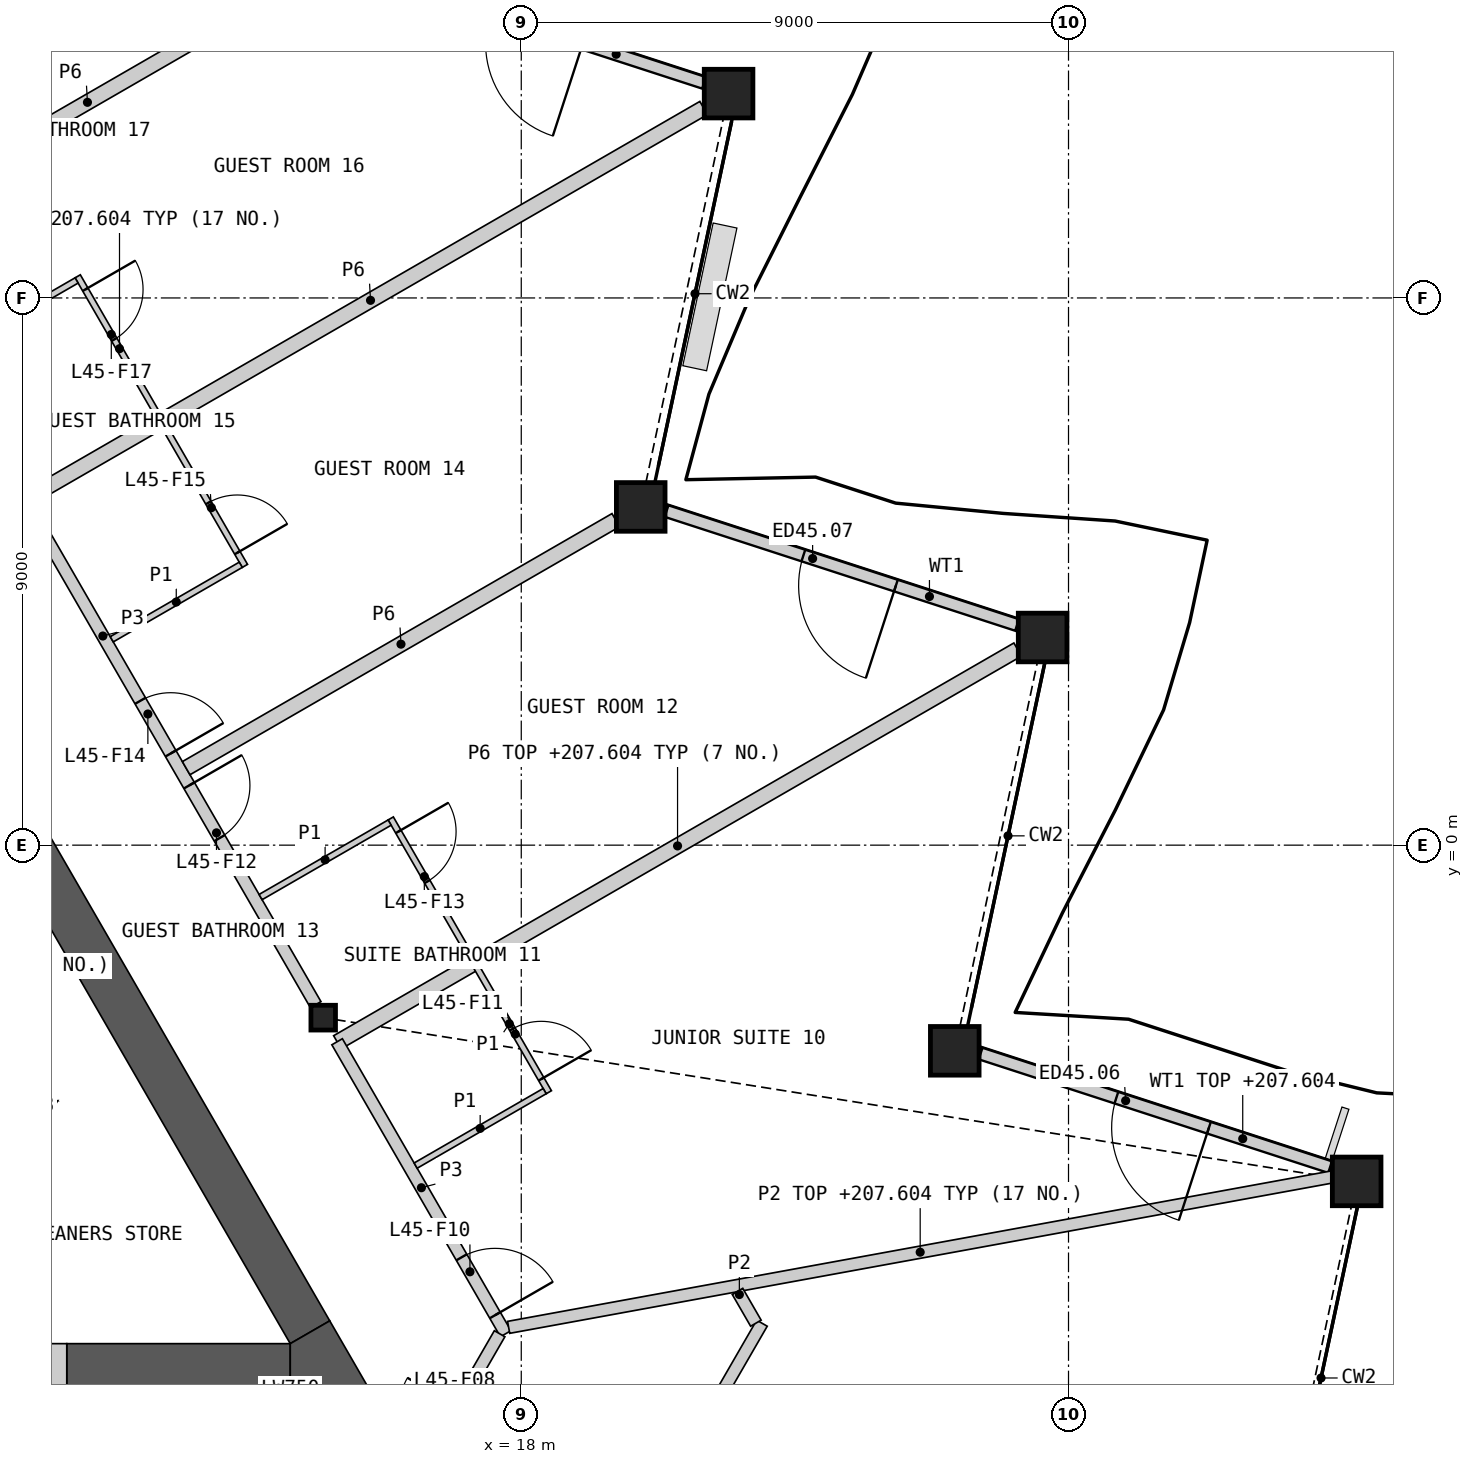
"""IFC4 building model, lengths in metres.
Left out: names, types, materials, properties, quantities, classifications, styles, units other than length and angle.
Written with IfcOpenShell. Run it as: python <this file> out.ifc"""

import sys

from ifc_helpers import new_model, si_unit, direction, frame, frame_2d, origin, origin_2d, place, context, subcontext, project, spatial, polyline, rectangle, hollow_rectangle, i_section, outline, extrude, element, fill, save


model = new_model("IFC4")
c1 = context("Model", 3, precision=1e-05, world=origin(), true_north=direction((0.0, 1.0)))
c2 = subcontext(c1, "Body", "Model", "MODEL_VIEW")
j1 = project(units=[si_unit("LENGTHUNIT", "METRE"), si_unit("PLANEANGLEUNIT", "RADIAN")], contexts=[c1])
p1 = place(None, origin())
s1 = spatial("IfcSite", under=j1, at=p1, CompositionType="ELEMENT")
p2 = place(p1, origin())
s2 = spatial("IfcBuilding", under=s1, at=p2, CompositionType="ELEMENT")
p3 = place(p2, frame((0.0, 0.0, 205.2)))
s3 = spatial("IfcBuildingStorey", under=s2, at=p3, CompositionType="ELEMENT", Elevation=205.2)
for number, where, z_axis, x_axis in (
    (1, (31.739, -5.53, 0.0), (0.0, 0.0, 1.0), (1.0, 0.0, 0.0)),
    (2, (25.129, -3.383, 0.0), (0.0, 0.0, 1.0), (1.0, 0.0, 0.0)),
    (3, (26.574, 3.415, 0.0), (0.0, 0.0, 1.0), (1.0, 0.0, 0.0)),
    (4, (19.965, 5.563, 0.0), (0.0, 0.0, 1.0), (1.0, 0.0, 0.0)),
    (5, (21.409, 12.361, 0.0), (0.0, 0.0, 1.0), (1.0, 0.0, 0.0)),
):
    element("IfcColumn", number, at=place(p3, frame(where, z_axis=z_axis, x_axis=x_axis)), inside=s3, PredefinedType="COLUMN", context=c2, shape_type="SweptSolid", body=[
        extrude(hollow_rectangle(XDim=0.8, YDim=0.8, WallThickness=0.05, at=origin_2d()), origin(), (0.0, 0.0, 1.0), 3.6),
    ])
p4 = place(p3, frame((14.743, -2.837, 0.0), z_axis=(0.0, 0.0, 1.0), x_axis=(1.0, 0.0, 0.0)))
e6 = element("IfcColumn", 6, at=p4, inside=s3, PredefinedType="COLUMN", context=c2, shape_type="SweptSolid", body=[
    extrude(i_section(OverallWidth=0.404, OverallDepth=0.407, WebThickness=0.027, FlangeThickness=0.044, at=origin_2d()), origin(), (0.0, 0.0, 1.0), 3.6),
])
p5 = place(p3, frame((31.302, -5.295, 0.0), z_axis=(0.0, 0.0, 1.0), x_axis=(-0.951059297078, 0.309008435874, 0.0)))
e7 = element("IfcWall", 7, at=p5, inside=s3, PredefinedType="SOLIDWALL", context=c2, shape_type="SweptSolid", body=[
    extrude(rectangle(XDim=6.044, YDim=0.2, at=frame_2d((3.022, 0.0))), origin(), (0.0, 0.0, 1.0), 2.404),
])
p6 = place(p5, frame((2.096, 0.0, 0.0)))
e8 = element("IfcOpeningElement", 8, at=p6, cuts=e7, PredefinedType="OPENING", context=c2, shape_type="SweptSolid", body=[
    extrude(rectangle(XDim=1.6, YDim=2.4, at=frame_2d((0.8, 1.2))), frame((0.0, 0.11, 0.0), z_axis=(0.0, -1.0, 0.0), x_axis=(1.0, 0.0, 0.0)), (0.0, 0.0, 1.0), 0.22),
])
p7 = place(p3, frame((26.154, 3.621, 0.0), z_axis=(0.0, 0.0, 1.0), x_axis=(-0.95104857086, 0.309041446839, 0.0)))
e9 = element("IfcWall", 9, at=p7, inside=s3, PredefinedType="SOLIDWALL", context=c2, shape_type="SweptSolid", body=[
    extrude(rectangle(XDim=6.062, YDim=0.2, at=frame_2d((3.031, 0.0))), origin(), (0.0, 0.0, 1.0), 2.701),
])
p8 = place(p7, frame((2.096, 0.0, 0.0)))
e10 = element("IfcOpeningElement", 10, at=p8, cuts=e9, PredefinedType="OPENING", context=c2, shape_type="SweptSolid", body=[
    extrude(rectangle(XDim=1.6, YDim=2.4, at=frame_2d((0.8, 1.2))), frame((0.0, 0.11, 0.0), z_axis=(0.0, -1.0, 0.0), x_axis=(1.0, 0.0, 0.0)), (0.0, 0.0, 1.0), 0.22),
])
p9 = place(p3, frame((21.006, 12.538, 0.0), z_axis=(0.0, 0.0, 1.0), x_axis=(-0.951049709595, 0.309037942458, 0.0)))
e11 = element("IfcWall", 11, at=p9, inside=s3, PredefinedType="SOLIDWALL", context=c2, shape_type="SweptSolid", body=[
    extrude(rectangle(XDim=6.079, YDim=0.2, at=frame_2d((3.04, 0.0))), origin(), (0.0, 0.0, 1.0), 2.701),
])
p10 = place(p9, frame((2.096, 0.0, 0.0)))
e12 = element("IfcOpeningElement", 12, at=p10, cuts=e11, PredefinedType="OPENING", context=c2, shape_type="SweptSolid", body=[
    extrude(rectangle(XDim=1.6, YDim=2.4, at=frame_2d((0.8, 1.2))), frame((0.0, 0.11, 0.0), z_axis=(0.0, -1.0, 0.0), x_axis=(1.0, 0.0, 0.0)), (0.0, 0.0, 1.0), 0.22),
])
p11 = place(p3, origin())
e13 = element("IfcWall", 13, at=p11, inside=s3, PredefinedType="SHEAR", context=c2, shape_type="SweptSolid", body=[
    extrude(outline(polyline([(8.83, -6.881), (10.374, -4.206), (10.032, -4.298), (8.738, -6.539), (8.83, -6.881)])), origin(), (0.0, 0.0, 1.0), 3.25),
])
p12 = place(p3, origin())
e14 = element("IfcWall", 14, at=p12, inside=s3, PredefinedType="SHEAR", context=c2, shape_type="SweptSolid", body=[
    extrude(outline(polyline([(10.032, -4.298), (10.374, -4.206), (5.307, -1.281), (5.182, -1.498), (10.032, -4.298)])), origin(), (0.0, 0.0, 1.0), 3.25),
])
p13 = place(p3, frame((10.525, -8.574, 0.0), z_axis=(0.0, 0.0, 1.0), x_axis=(1.0, 0.0, 0.0)))
e15 = element("IfcWall", 15, at=p13, inside=s3, PredefinedType="SHEAR", context=c2, shape_type="SweptSolid", body=[
    extrude(rectangle(XDim=3.676, YDim=0.75, at=frame_2d((1.838, 0.0))), origin(), (0.0, 0.0, 1.0), 3.25),
])
p14 = place(p3, frame((14.526, -8.011, 0.0), z_axis=(0.0, 0.0, 1.0), x_axis=(-0.499996012963, 0.866027705689, 0.0)))
e16 = element("IfcWall", 16, at=p14, inside=s3, PredefinedType="SHEAR", context=c2, shape_type="SweptSolid", body=[
    extrude(rectangle(XDim=15.039, YDim=0.75, at=frame_2d((7.519, 0.0))), origin(), (0.0, 0.0, 1.0), 3.25),
])
p15 = place(p3, origin())
e17 = element("IfcWall", 17, at=p15, inside=s3, PredefinedType="SHEAR", context=c2, shape_type="SweptSolid", body=[
    extrude(outline(polyline([(14.201, -8.949), (14.201, -8.199), (14.851, -7.824), (15.5, -8.949), (14.201, -8.949)])), origin(), (0.0, 0.0, 1.0), 3.25),
])
p16 = place(p3, frame((8.325, -8.574, 0.0), z_axis=(0.0, 0.0, 1.0), x_axis=(1.0, 0.0, 0.0)))
e18 = element("IfcWall", 18, at=p16, inside=s3, PredefinedType="SHEAR", context=c2, shape_type="SweptSolid", body=[
    extrude(rectangle(XDim=2.2, YDim=0.75, at=frame_2d((1.1, 0.0))), origin(), (0.0, 0.0, 1.0), 3.25),
])
p17 = place(p16, frame((0.6, 0.0, 0.0)))
e19 = element("IfcOpeningElement", 19, at=p17, cuts=e18, PredefinedType="OPENING", context=c2, shape_type="SweptSolid", body=[
    extrude(rectangle(XDim=1.0, YDim=2.1, at=frame_2d((0.5, 1.05))), frame((0.0, 0.385, 0.0), z_axis=(0.0, -1.0, 0.0), x_axis=(1.0, 0.0, 0.0)), (0.0, 0.0, 1.0), 0.77),
])
p18 = place(p3, frame((14.977, -3.242, 0.0), z_axis=(0.0, 0.0, 1.0), x_axis=(0.866026026416, 0.499998921569, 0.0)))
e20 = element("IfcWall", 20, at=p18, inside=s3, PredefinedType="PARTITIONING", context=c2, shape_type="SweptSolid", body=[
    extrude(rectangle(XDim=12.918, YDim=0.25, at=frame_2d((6.459, 0.0))), origin(), (0.0, 0.0, 1.0), 2.404),
])
p19 = place(p3, frame((10.042, 5.798, 0.0), z_axis=(0.0, 0.0, 1.0), x_axis=(0.866025883649, 0.499999168849, 0.0)))
e21 = element("IfcWall", 21, at=p19, inside=s3, PredefinedType="PARTITIONING", context=c2, shape_type="SweptSolid", body=[
    extrude(rectangle(XDim=12.652, YDim=0.25, at=frame_2d((6.326, 0.0))), origin(), (0.0, 0.0, 1.0), 2.404),
])
p20 = place(p3, frame((9.952, 5.461, 0.0), z_axis=(0.0, 0.0, 1.0), x_axis=(0.50000393355, -0.866023132736, 0.0)))
e22 = element("IfcWall", 22, at=p20, inside=s3, PredefinedType="PARTITIONING", context=c2, shape_type="SweptSolid", body=[
    extrude(rectangle(XDim=9.335, YDim=0.2, at=frame_2d((4.667, 0.0))), origin(), (0.0, 0.0, 1.0), 3.25),
])
p21 = place(p20, frame((5.172, 0.0, 0.0)))
e23 = element("IfcOpeningElement", 23, at=p21, cuts=e22, PredefinedType="OPENING", context=c2, shape_type="SweptSolid", body=[
    extrude(rectangle(XDim=1.0, YDim=2.1, at=frame_2d((0.5, 1.05))), frame((0.0, 0.11, 0.0), z_axis=(0.0, -1.0, 0.0), x_axis=(1.0, 0.0, 0.0)), (0.0, 0.0, 1.0), 0.22),
])
p22 = place(p20, frame((3.565, 0.0, 0.0)))
e24 = element("IfcOpeningElement", 24, at=p22, cuts=e22, PredefinedType="OPENING", context=c2, shape_type="SweptSolid", body=[
    extrude(rectangle(XDim=1.0, YDim=2.1, at=frame_2d((0.5, 1.05))), frame((0.0, 0.11, 0.0), z_axis=(0.0, -1.0, 0.0), x_axis=(1.0, 0.0, 0.0)), (0.0, 0.0, 1.0), 0.22),
])
p23 = place(p3, frame((12.489, 1.266, 0.0), z_axis=(0.0, 0.0, 1.0), x_axis=(0.866026623601, 0.49999788721, 0.0)))
e25 = element("IfcWall", 25, at=p23, inside=s3, PredefinedType="PARTITIONING", context=c2, shape_type="SweptSolid", body=[
    extrude(rectangle(XDim=8.159, YDim=0.25, at=frame_2d((4.079, 0.0))), origin(), (0.0, 0.0, 1.0), 2.404),
])
p24 = place(p3, frame((7.341, 10.183, 0.0), z_axis=(0.0, 0.0, 1.0), x_axis=(0.866028741424, 0.499994218994, 0.0)))
e26 = element("IfcWall", 26, at=p24, inside=s3, PredefinedType="PARTITIONING", context=c2, shape_type="SweptSolid", body=[
    extrude(rectangle(XDim=8.139, YDim=0.25, at=frame_2d((4.07, 0.0))), origin(), (0.0, 0.0, 1.0), 2.404),
])
p25 = place(p3, frame((14.971, -3.233, 0.0), z_axis=(0.0, 0.0, 1.0), x_axis=(0.500003221507, -0.866023543838, 0.0)))
e27 = element("IfcWall", 27, at=p25, inside=s3, PredefinedType="PARTITIONING", context=c2, shape_type="SweptSolid", body=[
    extrude(rectangle(XDim=5.545, YDim=0.2, at=frame_2d((2.772, 0.0))), origin(), (0.0, 0.0, 1.0), 3.25),
])
p26 = place(p25, frame((4.094, 0.0, 0.0)))
e28 = element("IfcOpeningElement", 28, at=p26, cuts=e27, PredefinedType="OPENING", context=c2, shape_type="SweptSolid", body=[
    extrude(rectangle(XDim=1.1, YDim=2.1, at=frame_2d((0.55, 1.05))), frame((0.0, 0.11, 0.0), z_axis=(0.0, -1.0, 0.0), x_axis=(1.0, 0.0, 0.0)), (0.0, 0.0, 1.0), 0.22),
])
p27 = place(p3, frame((15.731, -11.349, 0.0), z_axis=(0.0, 0.0, 1.0), x_axis=(0.499961815444, 0.866047448526, 0.0)))
e29 = element("IfcWall", 29, at=p27, inside=s3, PredefinedType="PARTITIONING", context=c2, shape_type="SweptSolid", body=[
    extrude(rectangle(XDim=3.826, YDim=0.2, at=frame_2d((1.913, 0.0))), origin(), (0.0, 0.0, 1.0), 3.25),
])
p28 = place(p27, frame((1.49, 0.0, 0.0)))
e30 = element("IfcOpeningElement", 30, at=p28, cuts=e29, PredefinedType="OPENING", context=c2, shape_type="SweptSolid", body=[
    extrude(rectangle(XDim=0.95, YDim=2.1, at=frame_2d((0.475, 1.05))), frame((0.0, 0.11, 0.0), z_axis=(0.0, -1.0, 0.0), x_axis=(1.0, 0.0, 0.0)), (0.0, 0.0, 1.0), 0.22),
])
p29 = place(p3, frame((17.792, -7.931, 0.0), z_axis=(0.0, 0.0, 1.0), x_axis=(0.983720538919, 0.179705039744, 0.0)))
e31 = element("IfcWall", 31, at=p29, inside=s3, PredefinedType="PARTITIONING", context=c2, shape_type="SweptSolid", body=[
    extrude(rectangle(XDim=13.761, YDim=0.2, at=frame_2d((6.88, 0.0))), origin(), (0.0, 0.0, 1.0), 2.404),
])
p30 = place(p3, frame((19.871, -11.479, 0.0), z_axis=(0.0, 0.0, 1.0), x_axis=(0.499987304225, 0.866032733569, 0.0)))
e32 = element("IfcWall", 32, at=p30, inside=s3, PredefinedType="PARTITIONING", context=c2, shape_type="SweptSolid", body=[
    extrude(rectangle(XDim=4.176, YDim=0.2, at=frame_2d((2.088, 0.0))), origin(), (0.0, 0.0, 1.0), 2.404),
])
p31 = place(p3, frame((21.556, -7.339, 0.0), z_axis=(0.0, 0.0, 1.0), x_axis=(0.50022374246, -0.865896187473, 0.0)))
e33 = element("IfcWall", 33, at=p31, inside=s3, PredefinedType="PARTITIONING", context=c2, shape_type="SweptSolid", body=[
    extrude(rectangle(XDim=0.604, YDim=0.2, at=frame_2d((0.302, 0.0))), origin(), (0.0, 0.0, 1.0), 2.404),
])
p32 = place(p3, frame((10.705, 9.356, 0.0), z_axis=(0.0, 0.0, 1.0), x_axis=(0.500015767406, -0.866016300277, 0.0)))
e34 = element("IfcWall", 34, at=p32, inside=s3, PredefinedType="PARTITIONING", context=c2, shape_type="SweptSolid", body=[
    extrude(rectangle(XDim=5.5, YDim=0.1, at=frame_2d((2.75, 0.0))), origin(), (0.0, 0.0, 1.0), 2.404),
])
p33 = place(p32, frame((4.3, 0.0, 0.0)))
e35 = element("IfcOpeningElement", 35, at=p33, cuts=e34, PredefinedType="OPENING", context=c2, shape_type="SweptSolid", body=[
    extrude(rectangle(XDim=0.95, YDim=2.1, at=frame_2d((0.475, 1.05))), frame((0.0, 0.06, 0.0), z_axis=(0.0, -1.0, 0.0), x_axis=(1.0, 0.0, 0.0)), (0.0, 0.0, 1.0), 0.12),
])
p34 = place(p32, frame((0.25, 0.0, 0.0)))
e36 = element("IfcOpeningElement", 36, at=p34, cuts=e34, PredefinedType="OPENING", context=c2, shape_type="SweptSolid", body=[
    extrude(rectangle(XDim=0.95, YDim=2.1, at=frame_2d((0.475, 1.05))), frame((0.0, 0.06, 0.0), z_axis=(0.0, -1.0, 0.0), x_axis=(1.0, 0.0, 0.0)), (0.0, 0.0, 1.0), 0.12),
])
p35 = place(p3, frame((15.853, 0.439, 0.0), z_axis=(0.0, 0.0, 1.0), x_axis=(0.499971721724, -0.866041729639, 0.0)))
e37 = element("IfcWall", 37, at=p35, inside=s3, PredefinedType="PARTITIONING", context=c2, shape_type="SweptSolid", body=[
    extrude(rectangle(XDim=5.2, YDim=0.1, at=frame_2d((2.6, 0.0))), origin(), (0.0, 0.0, 1.0), 2.404),
])
p36 = place(p35, frame((4.0, 0.0, 0.0)))
e38 = element("IfcOpeningElement", 38, at=p36, cuts=e37, PredefinedType="OPENING", context=c2, shape_type="SweptSolid", body=[
    extrude(rectangle(XDim=0.95, YDim=2.1, at=frame_2d((0.475, 1.05))), frame((0.0, 0.06, 0.0), z_axis=(0.0, -1.0, 0.0), x_axis=(1.0, 0.0, 0.0)), (0.0, 0.0, 1.0), 0.12),
])
p37 = place(p35, frame((0.25, 0.0, 0.0)))
e39 = element("IfcOpeningElement", 39, at=p37, cuts=e37, PredefinedType="OPENING", context=c2, shape_type="SweptSolid", body=[
    extrude(rectangle(XDim=0.95, YDim=2.1, at=frame_2d((0.475, 1.05))), frame((0.0, 0.06, 0.0), z_axis=(0.0, -1.0, 0.0), x_axis=(1.0, 0.0, 0.0)), (0.0, 0.0, 1.0), 0.12),
])
p38 = place(p3, frame((13.713, -0.854, 0.0), z_axis=(0.0, 0.0, 1.0), x_axis=(0.866014668023, 0.500018594424, 0.0)))
e40 = element("IfcWall", 40, at=p38, inside=s3, PredefinedType="PARTITIONING", context=c2, shape_type="SweptSolid", body=[
    extrude(rectangle(XDim=2.45, YDim=0.1, at=frame_2d((1.225, 0.0))), origin(), (0.0, 0.0, 1.0), 2.404),
])
p39 = place(p3, frame((16.263, -5.271, 0.0), z_axis=(0.0, 0.0, 1.0), x_axis=(0.866057815567, 0.499943856944, 0.0)))
e41 = element("IfcWall", 41, at=p39, inside=s3, PredefinedType="PARTITIONING", context=c2, shape_type="SweptSolid", body=[
    extrude(rectangle(XDim=2.45, YDim=0.1, at=frame_2d((1.225, 0.0))), origin(), (0.0, 0.0, 1.0), 2.404),
])
for number, where, z_axis, x_axis in (
    (42, (8.565, 8.063, 0.0), (0.0, 0.0, 1.0), (0.866, 0.5, 0.0)),
    (43, (11.265, 3.386, 0.0), (0.0, 0.0, 1.0), (0.866, 0.5, 0.0)),
):
    element("IfcWall", number, at=place(p3, frame(where, z_axis=z_axis, x_axis=x_axis)), inside=s3, PredefinedType="PARTITIONING", context=c2, shape_type="SweptSolid", body=[
        extrude(rectangle(XDim=2.45, YDim=0.1, at=frame_2d((1.225, 0.0))), origin(), (0.0, 0.0, 1.0), 2.404),
    ])
p40 = place(p6, origin())
e44 = element("IfcDoor", 44, at=p40, inside=s3, OperationType="DOUBLE_DOOR_SINGLE_SWING", PredefinedType="DOOR", context=c2, shape_type="SweptSolid", body=[
    extrude(rectangle(XDim=1.6, YDim=2.4, at=frame_2d((0.8, 1.2))), frame((0.0, 0.025, 0.0), z_axis=(0.0, -1.0, 0.0), x_axis=(1.0, 0.0, 0.0)), (0.0, 0.0, 1.0), 0.05),
])
fill(e8, e44)
p41 = place(p8, origin())
e45 = element("IfcDoor", 45, at=p41, inside=s3, OperationType="DOUBLE_DOOR_SINGLE_SWING", PredefinedType="DOOR", context=c2, shape_type="SweptSolid", body=[
    extrude(rectangle(XDim=1.6, YDim=2.4, at=frame_2d((0.8, 1.2))), frame((0.0, 0.025, 0.0), z_axis=(0.0, -1.0, 0.0), x_axis=(1.0, 0.0, 0.0)), (0.0, 0.0, 1.0), 0.05),
])
fill(e10, e45)
p42 = place(p26, origin())
e46 = element("IfcDoor", 46, at=p42, inside=s3, OperationType="SINGLE_SWING_RIGHT", PredefinedType="DOOR", context=c2, shape_type="SweptSolid", body=[
    extrude(rectangle(XDim=1.1, YDim=2.1, at=frame_2d((0.55, 1.05))), frame((0.0, 0.025, 0.0), z_axis=(0.0, -1.0, 0.0), x_axis=(1.0, 0.0, 0.0)), (0.0, 0.0, 1.0), 0.05),
])
fill(e28, e46)
p43 = place(p36, origin())
e47 = element("IfcDoor", 47, at=p43, inside=s3, OperationType="SINGLE_SWING_RIGHT", PredefinedType="DOOR", context=c2, shape_type="SweptSolid", body=[
    extrude(rectangle(XDim=0.95, YDim=2.1, at=frame_2d((0.475, 1.05))), frame((0.0, 0.025, 0.0), z_axis=(0.0, -1.0, 0.0), x_axis=(1.0, 0.0, 0.0)), (0.0, 0.0, 1.0), 0.05),
])
fill(e38, e47)
p44 = place(p21, origin())
e48 = element("IfcDoor", 48, at=p44, inside=s3, OperationType="SINGLE_SWING_LEFT", PredefinedType="DOOR", context=c2, shape_type="SweptSolid", body=[
    extrude(rectangle(XDim=1.0, YDim=2.1, at=frame_2d((0.5, 1.05))), frame((0.0, 0.025, 0.0), z_axis=(0.0, -1.0, 0.0), x_axis=(1.0, 0.0, 0.0)), (0.0, 0.0, 1.0), 0.05),
])
fill(e23, e48)
p45 = place(p37, origin())
e49 = element("IfcDoor", 49, at=p45, inside=s3, OperationType="SINGLE_SWING_LEFT", PredefinedType="DOOR", context=c2, shape_type="SweptSolid", body=[
    extrude(rectangle(XDim=0.95, YDim=2.1, at=frame_2d((0.475, 1.05))), frame((0.0, 0.025, 0.0), z_axis=(0.0, -1.0, 0.0), x_axis=(1.0, 0.0, 0.0)), (0.0, 0.0, 1.0), 0.05),
])
fill(e39, e49)
p46 = place(p22, origin())
e50 = element("IfcDoor", 50, at=p46, inside=s3, OperationType="SINGLE_SWING_RIGHT", PredefinedType="DOOR", context=c2, shape_type="SweptSolid", body=[
    extrude(rectangle(XDim=1.0, YDim=2.1, at=frame_2d((0.5, 1.05))), frame((0.0, 0.025, 0.0), z_axis=(0.0, -1.0, 0.0), x_axis=(1.0, 0.0, 0.0)), (0.0, 0.0, 1.0), 0.05),
])
fill(e24, e50)
p47 = place(p33, origin())
e51 = element("IfcDoor", 51, at=p47, inside=s3, OperationType="SINGLE_SWING_RIGHT", PredefinedType="DOOR", context=c2, shape_type="SweptSolid", body=[
    extrude(rectangle(XDim=0.95, YDim=2.1, at=frame_2d((0.475, 1.05))), frame((0.0, 0.025, 0.0), z_axis=(0.0, -1.0, 0.0), x_axis=(1.0, 0.0, 0.0)), (0.0, 0.0, 1.0), 0.05),
])
fill(e35, e51)
p48 = place(p34, origin())
e52 = element("IfcDoor", 52, at=p48, inside=s3, OperationType="SINGLE_SWING_LEFT", PredefinedType="DOOR", context=c2, shape_type="SweptSolid", body=[
    extrude(rectangle(XDim=0.95, YDim=2.1, at=frame_2d((0.475, 1.05))), frame((0.0, 0.025, 0.0), z_axis=(0.0, -1.0, 0.0), x_axis=(1.0, 0.0, 0.0)), (0.0, 0.0, 1.0), 0.05),
])
fill(e36, e52)
save(model, sys.argv[1])
